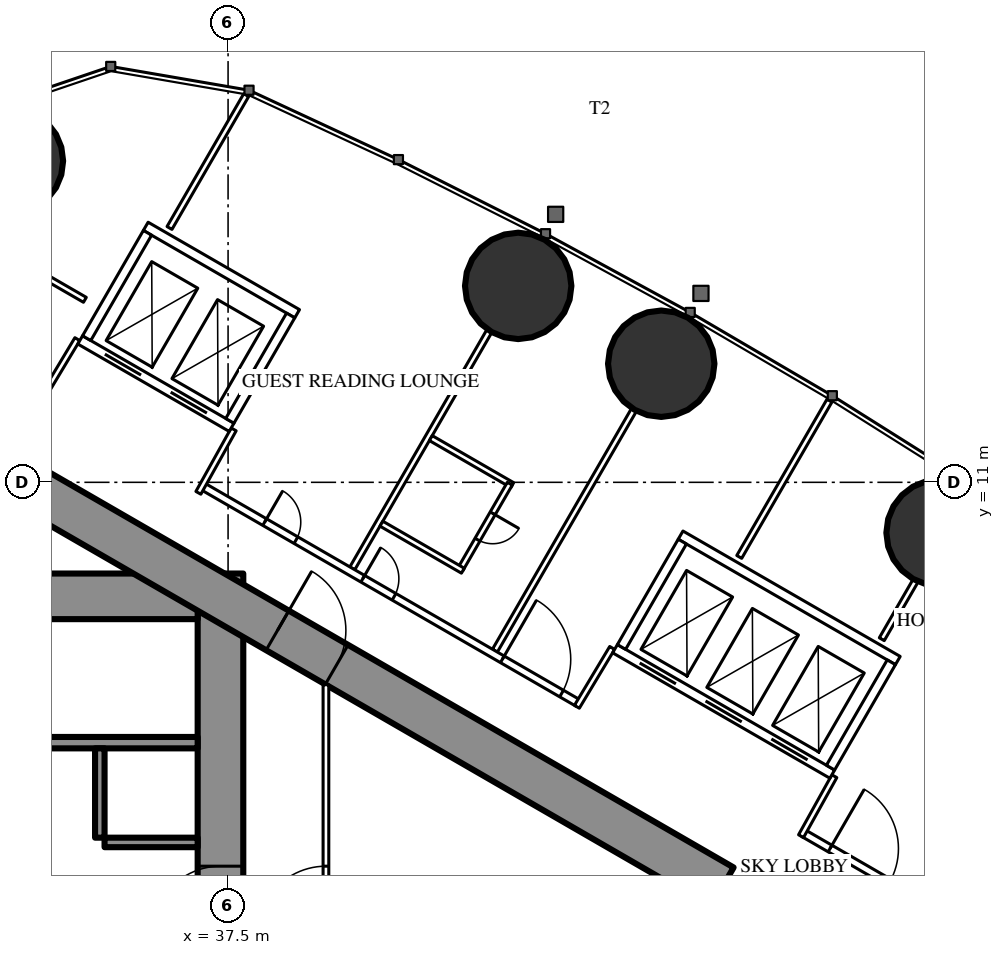
"""IFC4 building model, lengths in metres.
Left out: names, types, materials, properties, quantities, classifications, styles, units other than length and angle.
Written with IfcOpenShell. Run it as: python <this file> out.ifc"""

import sys

from ifc_helpers import new_model, si_unit, direction, frame, frame_2d, origin, origin_2d, place, context, subcontext, project, spatial, rectangle, circle, extrude, element, fill, save


model = new_model("IFC4")
c1 = context("Model", 3, precision=1e-05, world=origin(), true_north=direction((0.0, 1.0)))
c2 = subcontext(c1, "Body", "Model", "MODEL_VIEW")
j1 = project(units=[si_unit("LENGTHUNIT", "METRE"), si_unit("PLANEANGLEUNIT", "RADIAN")], contexts=[c1])
p1 = place(None, origin())
s1 = spatial("IfcSite", under=j1, at=p1, CompositionType="ELEMENT")
p2 = place(p1, origin())
s2 = spatial("IfcBuilding", under=s1, at=p2, CompositionType="ELEMENT")
p3 = place(p2, frame((0.0, 0.0, 156.3)))
s3 = spatial("IfcBuildingStorey", under=s2, at=p3, CompositionType="ELEMENT", Elevation=156.3)
for number, where, z_axis, x_axis in (
    (1, (31.76, 19.456, 0.0), (0.0, 0.0, 1.0), (1.0, 0.0, 0.0)),
    (2, (56.221, 9.672, 0.0), (0.0, 0.0, 1.0), (1.0, 0.0, 0.0)),
    (3, (48.897, 14.121, 0.0), (0.0, 0.0, 1.0), (1.0, 0.0, 0.0)),
    (4, (45.134, 16.168, 0.0), (0.0, 0.0, 1.0), (1.0, 0.0, 0.0)),
):
    element("IfcColumn", number, at=place(p3, frame(where, z_axis=z_axis, x_axis=x_axis)), inside=s3, PredefinedType="COLUMN", context=c2, shape_type="SweptSolid", body=[
        extrude(circle(Radius=1.4, at=origin_2d()), origin(), (0.0, 0.0, 1.0), 3.5),
    ])
p4 = place(p3, frame((37.3, -8.6, 0.0), z_axis=(0.0, 0.0, 1.0), x_axis=(0.0, 1.0, 0.0)))
e5 = element("IfcWall", 5, at=p4, inside=s3, PredefinedType="SHEAR", context=c2, shape_type="SweptSolid", body=[
    extrude(rectangle(XDim=17.2, YDim=1.2, at=frame_2d((8.6, 0.0))), origin(), (0.0, 0.0, 1.0), 3.5),
])
p5 = place(p4, frame((7.7, 0.0, 0.0)))
e6 = element("IfcOpeningElement", 6, at=p5, cuts=e5, PredefinedType="OPENING", context=c2, shape_type="SweptSolid", body=[
    extrude(rectangle(XDim=1.8, YDim=2.2, at=frame_2d((0.9, 1.1))), frame((0.0, 0.61, 0.0), z_axis=(0.0, -1.0, 0.0), x_axis=(1.0, 0.0, 0.0)), (0.0, 0.0, 1.0), 1.22),
])
p6 = place(p3, frame((28.3, 8.0, 0.0), z_axis=(0.0, 0.0, 1.0), x_axis=(1.0, 0.0, 0.0)))
e7 = element("IfcWall", 7, at=p6, inside=s3, PredefinedType="SHEAR", context=c2, shape_type="SweptSolid", body=[
    extrude(rectangle(XDim=8.4, YDim=1.2, at=frame_2d((4.2, 0.0))), origin(), (0.0, 0.0, 1.0), 3.5),
])
p7 = place(p6, frame((0.25, 0.0, 0.0)))
e8 = element("IfcOpeningElement", 8, at=p7, cuts=e7, PredefinedType="OPENING", context=c2, shape_type="SweptSolid", body=[
    extrude(rectangle(XDim=1.0, YDim=2.2, at=frame_2d((0.5, 1.1))), frame((0.0, 0.61, 0.0), z_axis=(0.0, -1.0, 0.0), x_axis=(1.0, 0.0, 0.0)), (0.0, 0.0, 1.0), 1.22),
])
p8 = place(p3, frame((28.3, 4.15, 0.0), z_axis=(0.0, 0.0, 1.0), x_axis=(1.0, 0.0, 0.0)))
e9 = element("IfcWall", 9, at=p8, inside=s3, PredefinedType="SHEAR", context=c2, shape_type="SweptSolid", body=[
    extrude(rectangle(XDim=8.4, YDim=0.3, at=frame_2d((4.2, 0.0))), origin(), (0.0, 0.0, 1.0), 3.5),
])
p9 = place(p3, frame((34.125, 1.65, 0.0), z_axis=(0.0, 0.0, 1.0), x_axis=(0.0, 1.0, 0.0)))
e10 = element("IfcWall", 10, at=p9, inside=s3, PredefinedType="SHEAR", context=c2, shape_type="SweptSolid", body=[
    extrude(rectangle(XDim=2.35, YDim=0.25, at=frame_2d((1.175, 0.0))), origin(), (0.0, 0.0, 1.0), 3.5),
])
p10 = place(p3, frame((34.25, 1.525, 0.0), z_axis=(0.0, 0.0, 1.0), x_axis=(1.0, 0.0, 0.0)))
e11 = element("IfcWall", 11, at=p10, inside=s3, PredefinedType="SHEAR", context=c2, shape_type="SweptSolid", body=[
    extrude(rectangle(XDim=2.45, YDim=0.25, at=frame_2d((1.225, 0.0))), origin(), (0.0, 0.0, 1.0), 3.5),
])
p11 = place(p3, frame((27.2, -13.8, 0.0), z_axis=(0.0, 0.0, 1.0), x_axis=(0.866027159892, 0.499996958321, 0.0)))
e12 = element("IfcWall", 12, at=p11, inside=s3, PredefinedType="SHEAR", context=c2, shape_type="SweptSolid", body=[
    extrude(rectangle(XDim=27.947, YDim=1.2, at=frame_2d((13.973, 0.0))), origin(), (0.0, 0.0, 1.0), 3.5),
])
p12 = place(p11, frame((4.6, 0.0, 0.0)))
e13 = element("IfcOpeningElement", 13, at=p12, cuts=e12, PredefinedType="OPENING", context=c2, shape_type="SweptSolid", body=[
    extrude(rectangle(XDim=1.0, YDim=2.2, at=frame_2d((0.5, 1.1))), frame((0.0, 0.61, 0.0), z_axis=(0.0, -1.0, 0.0), x_axis=(1.0, 0.0, 0.0)), (0.0, 0.0, 1.0), 1.22),
])
p13 = place(p11, frame((13.395, 0.0, 0.0)))
e14 = element("IfcOpeningElement", 14, at=p13, cuts=e12, PredefinedType="OPENING", context=c2, shape_type="SweptSolid", body=[
    extrude(rectangle(XDim=1.8, YDim=2.2, at=frame_2d((0.9, 1.1))), frame((0.0, 0.61, 0.0), z_axis=(0.0, -1.0, 0.0), x_axis=(1.0, 0.0, 0.0)), (0.0, 0.0, 1.0), 1.22),
])
p14 = place(p3, frame((27.2, 13.8, 0.0), z_axis=(0.0, 0.0, 1.0), x_axis=(0.866024515034, -0.500001539357, 0.0)))
e15 = element("IfcWall", 15, at=p14, inside=s3, PredefinedType="SHEAR", context=c2, shape_type="SweptSolid", body=[
    extrude(rectangle(XDim=26.907, YDim=1.2, at=frame_2d((13.454, 0.0))), origin(), (0.0, 0.0, 1.0), 3.5),
])
p15 = place(p14, frame((4.6, 0.0, 0.0)))
e16 = element("IfcOpeningElement", 16, at=p15, cuts=e15, PredefinedType="OPENING", context=c2, shape_type="SweptSolid", body=[
    extrude(rectangle(XDim=1.0, YDim=2.2, at=frame_2d((0.5, 1.1))), frame((0.0, 0.61, 0.0), z_axis=(0.0, -1.0, 0.0), x_axis=(1.0, 0.0, 0.0)), (0.0, 0.0, 1.0), 1.22),
])
p16 = place(p14, frame((13.395, 0.0, 0.0)))
e17 = element("IfcOpeningElement", 17, at=p16, cuts=e15, PredefinedType="OPENING", context=c2, shape_type="SweptSolid", body=[
    extrude(rectangle(XDim=1.8, YDim=2.2, at=frame_2d((0.9, 1.1))), frame((0.0, 0.61, 0.0), z_axis=(0.0, -1.0, 0.0), x_axis=(1.0, 0.0, 0.0)), (0.0, 0.0, 1.0), 1.22),
])
p17 = place(p3, frame((40.769, 8.737, 0.0), z_axis=(0.0, 0.0, 1.0), x_axis=(0.500013115284, 0.866017831539, 0.0)))
e18 = element("IfcWall", 18, at=p17, inside=s3, PredefinedType="PARTITIONING", context=c2, shape_type="SweptSolid", body=[
    extrude(rectangle(XDim=7.198, YDim=0.15, at=frame_2d((3.599, 0.0))), origin(), (0.0, 0.0, 1.0), 2.3),
])
p18 = place(p3, frame((44.521, 6.571, 0.0), z_axis=(0.0, 0.0, 1.0), x_axis=(0.500020376429, 0.866013639128, 0.0)))
e19 = element("IfcWall", 19, at=p18, inside=s3, PredefinedType="PARTITIONING", context=c2, shape_type="SweptSolid", body=[
    extrude(rectangle(XDim=7.306, YDim=0.15, at=frame_2d((3.653, 0.0))), origin(), (0.0, 0.0, 1.0), 2.3),
])
p19 = place(p3, frame((35.959, 17.692, 0.0), z_axis=(0.0, 0.0, 1.0), x_axis=(0.499991298838, 0.866030427344, 0.0)))
e20 = element("IfcWall", 20, at=p19, inside=s3, PredefinedType="PARTITIONING", context=c2, shape_type="SweptSolid", body=[
    extrude(rectangle(XDim=4.035, YDim=0.15, at=frame_2d((2.018, 0.0))), origin(), (0.0, 0.0, 1.0), 3.25),
])
p20 = place(p3, frame((50.95, 9.037, 0.0), z_axis=(0.0, 0.0, 1.0), x_axis=(0.499988022762, 0.866032318735, 0.0)))
e21 = element("IfcWall", 21, at=p20, inside=s3, PredefinedType="PARTITIONING", context=c2, shape_type="SweptSolid", body=[
    extrude(rectangle(XDim=4.748, YDim=0.15, at=frame_2d((2.374, 0.0))), origin(), (0.0, 0.0, 1.0), 3.25),
])
p21 = place(p3, frame((54.7, 6.872, 0.0), z_axis=(0.0, 0.0, 1.0), x_axis=(0.499989690894, 0.866031355668, 0.0)))
e22 = element("IfcWall", 22, at=p21, inside=s3, PredefinedType="PARTITIONING", context=c2, shape_type="SweptSolid", body=[
    extrude(rectangle(XDim=1.766, YDim=0.15, at=frame_2d((0.883, 0.0))), origin(), (0.0, 0.0, 1.0), 3.25),
])
p22 = place(p3, frame((36.834, 10.894, 0.0), z_axis=(0.0, 0.0, 1.0), x_axis=(0.866031655879, -0.499989170898, 0.0)))
e23 = element("IfcWall", 23, at=p22, inside=s3, PredefinedType="PARTITIONING", context=c2, shape_type="SweptSolid", body=[
    extrude(rectangle(XDim=11.41, YDim=0.2, at=frame_2d((5.705, 0.0))), origin(), (0.0, 0.0, 1.0), 3.25),
])
p23 = place(p22, frame((4.861, 0.0, 0.0)))
e24 = element("IfcOpeningElement", 24, at=p23, cuts=e23, PredefinedType="OPENING", context=c2, shape_type="SweptSolid", body=[
    extrude(rectangle(XDim=0.95, YDim=2.2, at=frame_2d((0.475, 1.1))), frame((0.0, 0.11, 0.0), z_axis=(0.0, -1.0, 0.0), x_axis=(1.0, 0.0, 0.0)), (0.0, 0.0, 1.0), 0.22),
])
p24 = place(p22, frame((1.881, 0.0, 0.0)))
e25 = element("IfcOpeningElement", 25, at=p24, cuts=e23, PredefinedType="OPENING", context=c2, shape_type="SweptSolid", body=[
    extrude(rectangle(XDim=0.95, YDim=2.2, at=frame_2d((0.475, 1.1))), frame((0.0, 0.11, 0.0), z_axis=(0.0, -1.0, 0.0), x_axis=(1.0, 0.0, 0.0)), (0.0, 0.0, 1.0), 0.22),
])
p25 = place(p22, frame((9.102, 0.0, 0.0)))
e26 = element("IfcOpeningElement", 26, at=p25, cuts=e23, PredefinedType="OPENING", context=c2, shape_type="SweptSolid", body=[
    extrude(rectangle(XDim=1.8, YDim=2.2, at=frame_2d((0.9, 1.1))), frame((0.0, 0.11, 0.0), z_axis=(0.0, -1.0, 0.0), x_axis=(1.0, 0.0, 0.0)), (0.0, 0.0, 1.0), 0.22),
])
p26 = place(p3, frame((52.639, 1.769, 0.0), z_axis=(0.0, 0.0, 1.0), x_axis=(0.866027340901, -0.4999966448, 0.0)))
e27 = element("IfcWall", 27, at=p26, inside=s3, PredefinedType="PARTITIONING", context=c2, shape_type="SweptSolid", body=[
    extrude(rectangle(XDim=3.417, YDim=0.2, at=frame_2d((1.708, 0.0))), origin(), (0.0, 0.0, 1.0), 3.25),
])
p27 = place(p26, frame((0.809, 0.0, 0.0)))
e28 = element("IfcOpeningElement", 28, at=p27, cuts=e27, PredefinedType="OPENING", context=c2, shape_type="SweptSolid", body=[
    extrude(rectangle(XDim=1.8, YDim=2.2, at=frame_2d((0.9, 1.1))), frame((0.0, 0.11, 0.0), z_axis=(0.0, -1.0, 0.0), x_axis=(1.0, 0.0, 0.0)), (0.0, 0.0, 1.0), 0.22),
])
p28 = place(p3, frame((36.719, 10.723, 0.0), z_axis=(0.0, 0.0, 1.0), x_axis=(0.486348184724, 0.87376509613, 0.0)))
e29 = element("IfcWall", 29, at=p28, inside=s3, PredefinedType="PARTITIONING", context=c2, shape_type="SweptSolid", body=[
    extrude(rectangle(XDim=1.91, YDim=0.15, at=frame_2d((0.955, 0.0))), origin(), (0.0, 0.0, 1.0), 3.25),
])
for number, where, z_axis, x_axis in (
    (30, (33.533, 14.767, 0.0), (0.0, 0.0, 1.0), (-0.514, -0.858, 0.0)),
    (31, (52.576, 1.689, 0.0), (0.0, 0.0, 1.0), (0.485, 0.874, 0.0)),
    (32, (47.606, 6.643, 0.0), (0.0, 0.0, 1.0), (-0.514, -0.858, 0.0)),
):
    element("IfcWall", number, at=place(p3, frame(where, z_axis=z_axis, x_axis=x_axis)), inside=s3, PredefinedType="PARTITIONING", context=c2, shape_type="SweptSolid", body=[
        extrude(rectangle(XDim=1.805, YDim=0.15, at=frame_2d((0.902, 0.0))), origin(), (0.0, 0.0, 1.0), 3.25),
    ])
p29 = place(p3, frame((42.834, 12.164, 0.0), z_axis=(0.0, 0.0, 1.0), x_axis=(0.866031185235, -0.4999899861, 0.0)))
e33 = element("IfcWall", 33, at=p29, inside=s3, PredefinedType="PARTITIONING", context=c2, shape_type="SweptSolid", body=[
    extrude(rectangle(XDim=2.475, YDim=0.15, at=frame_2d((1.238, 0.0))), origin(), (0.0, 0.0, 1.0), 3.25),
])
p30 = place(p3, frame((43.613, 8.712, 0.0), z_axis=(0.0, 0.0, 1.0), x_axis=(0.500006934395, 0.866021400173, 0.0)))
e34 = element("IfcWall", 34, at=p30, inside=s3, PredefinedType="PARTITIONING", context=c2, shape_type="SweptSolid", body=[
    extrude(rectangle(XDim=2.6, YDim=0.15, at=frame_2d((1.3, 0.0))), origin(), (0.0, 0.0, 1.0), 3.25),
])
p31 = place(p30, frame((0.9, 0.0, 0.0)))
e35 = element("IfcOpeningElement", 35, at=p31, cuts=e34, PredefinedType="OPENING", context=c2, shape_type="SweptSolid", body=[
    extrude(rectangle(XDim=0.8, YDim=2.2, at=frame_2d((0.4, 1.1))), frame((0.0, 0.085, 0.0), z_axis=(0.0, -1.0, 0.0), x_axis=(1.0, 0.0, 0.0)), (0.0, 0.0, 1.0), 0.17),
])
p32 = place(p3, frame((41.534, 9.912, 0.0), z_axis=(0.0, 0.0, 1.0), x_axis=(0.866031185235, -0.4999899861, 0.0)))
e36 = element("IfcWall", 36, at=p32, inside=s3, PredefinedType="PARTITIONING", context=c2, shape_type="SweptSolid", body=[
    extrude(rectangle(XDim=2.475, YDim=0.15, at=frame_2d((1.238, 0.0))), origin(), (0.0, 0.0, 1.0), 2.45),
])
p33 = place(p3, frame((31.589, 17.04, 0.0), z_axis=(0.0, 0.0, 1.0), x_axis=(0.866006523861, -0.500032699561, 0.0)))
e37 = element("IfcWall", 37, at=p33, inside=s3, PredefinedType="PARTITIONING", context=c2, shape_type="SweptSolid", body=[
    extrude(rectangle(XDim=2.475, YDim=0.15, at=frame_2d((1.237, 0.0))), origin(), (0.0, 0.0, 1.0), 3.25),
])
p34 = place(p3, frame((40.075, -5.674, 0.0), z_axis=(0.0, 0.0, 1.0), x_axis=(0.0, 1.0, 0.0)))
e38 = element("IfcWall", 38, at=p34, inside=s3, PredefinedType="PARTITIONING", context=c2, shape_type="SweptSolid", body=[
    extrude(rectangle(XDim=11.348, YDim=0.15, at=frame_2d((5.674, 0.0))), origin(), (0.0, 0.0, 1.0), 3.25),
])
p35 = place(p34, frame((4.774, 0.0, 0.0)))
e39 = element("IfcOpeningElement", 39, at=p35, cuts=e38, PredefinedType="OPENING", context=c2, shape_type="SweptSolid", body=[
    extrude(rectangle(XDim=1.8, YDim=2.2, at=frame_2d((0.9, 1.1))), frame((0.0, 0.085, 0.0), z_axis=(0.0, -1.0, 0.0), x_axis=(1.0, 0.0, 0.0)), (0.0, 0.0, 1.0), 0.17),
])
p36 = place(p3, frame((33.608, 14.747, 0.0), z_axis=(0.0, 0.0, 1.0), x_axis=(0.866043305498, -0.49996899204, 0.0)))
e40 = element("IfcWall", 40, at=p36, inside=s3, PredefinedType="PARTITIONING", context=c2, shape_type="SweptSolid", body=[
    extrude(rectangle(XDim=4.6, YDim=0.25, at=frame_2d((2.3, 0.0))), origin(), (0.0, 0.0, 1.0), 3.25),
])
p37 = place(p36, frame((0.75, 0.0, 0.0)))
e41 = element("IfcOpeningElement", 41, at=p37, cuts=e40, PredefinedType="OPENING", context=c2, shape_type="SweptSolid", body=[
    extrude(rectangle(XDim=1.1, YDim=2.2, at=frame_2d((0.55, 1.1))), frame((0.0, 0.135, 0.0), z_axis=(0.0, -1.0, 0.0), x_axis=(1.0, 0.0, 0.0)), (0.0, 0.0, 1.0), 0.27),
])
p38 = place(p36, frame((2.75, 0.0, 0.0)))
e42 = element("IfcOpeningElement", 42, at=p38, cuts=e40, PredefinedType="OPENING", context=c2, shape_type="SweptSolid", body=[
    extrude(rectangle(XDim=1.1, YDim=2.2, at=frame_2d((0.55, 1.1))), frame((0.0, 0.135, 0.0), z_axis=(0.0, -1.0, 0.0), x_axis=(1.0, 0.0, 0.0)), (0.0, 0.0, 1.0), 0.27),
])
p39 = place(p3, frame((35.333, 17.736, 0.0), z_axis=(0.0, 0.0, 1.0), x_axis=(0.866043305498, -0.49996899204, 0.0)))
e43 = element("IfcWall", 43, at=p39, inside=s3, PredefinedType="PARTITIONING", context=c2, shape_type="SweptSolid", body=[
    extrude(rectangle(XDim=4.6, YDim=0.25, at=frame_2d((2.3, 0.0))), origin(), (0.0, 0.0, 1.0), 3.25),
])
for number, where, z_axis, x_axis in (
    (44, (33.779, 14.793, 0.0), (0.0, 0.0, 1.0), (0.5, 0.866, 0.0)),
    (45, (37.547, 12.618, 0.0), (0.0, 0.0, 1.0), (0.5, 0.866, 0.0)),
):
    element("IfcWall", number, at=place(p3, frame(where, z_axis=z_axis, x_axis=x_axis)), inside=s3, PredefinedType="PARTITIONING", context=c2, shape_type="SweptSolid", body=[
        extrude(rectangle(XDim=3.201, YDim=0.25, at=frame_2d((1.6, 0.0))), origin(), (0.0, 0.0, 1.0), 3.25),
    ])
p40 = place(p3, frame((47.681, 6.622, 0.0), z_axis=(0.0, 0.0, 1.0), x_axis=(0.86603344179, -0.499986077507, 0.0)))
e46 = element("IfcWall", 46, at=p40, inside=s3, PredefinedType="PARTITIONING", context=c2, shape_type="SweptSolid", body=[
    extrude(rectangle(XDim=6.6, YDim=0.25, at=frame_2d((3.3, 0.0))), origin(), (0.0, 0.0, 1.0), 3.25),
])
p41 = place(p40, frame((0.75, 0.0, 0.0)))
e47 = element("IfcOpeningElement", 47, at=p41, cuts=e46, PredefinedType="OPENING", context=c2, shape_type="SweptSolid", body=[
    extrude(rectangle(XDim=1.1, YDim=2.2, at=frame_2d((0.55, 1.1))), frame((0.0, 0.135, 0.0), z_axis=(0.0, -1.0, 0.0), x_axis=(1.0, 0.0, 0.0)), (0.0, 0.0, 1.0), 0.27),
])
p42 = place(p40, frame((2.75, 0.0, 0.0)))
e48 = element("IfcOpeningElement", 48, at=p42, cuts=e46, PredefinedType="OPENING", context=c2, shape_type="SweptSolid", body=[
    extrude(rectangle(XDim=1.1, YDim=2.2, at=frame_2d((0.55, 1.1))), frame((0.0, 0.135, 0.0), z_axis=(0.0, -1.0, 0.0), x_axis=(1.0, 0.0, 0.0)), (0.0, 0.0, 1.0), 0.27),
])
p43 = place(p40, frame((4.75, 0.0, 0.0)))
e49 = element("IfcOpeningElement", 49, at=p43, cuts=e46, PredefinedType="OPENING", context=c2, shape_type="SweptSolid", body=[
    extrude(rectangle(XDim=1.1, YDim=2.2, at=frame_2d((0.55, 1.1))), frame((0.0, 0.135, 0.0), z_axis=(0.0, -1.0, 0.0), x_axis=(1.0, 0.0, 0.0)), (0.0, 0.0, 1.0), 0.27),
])
p44 = place(p3, frame((49.406, 9.611, 0.0), z_axis=(0.0, 0.0, 1.0), x_axis=(0.86603344179, -0.499986077507, 0.0)))
e50 = element("IfcWall", 50, at=p44, inside=s3, PredefinedType="PARTITIONING", context=c2, shape_type="SweptSolid", body=[
    extrude(rectangle(XDim=6.6, YDim=0.25, at=frame_2d((3.3, 0.0))), origin(), (0.0, 0.0, 1.0), 3.25),
])
p45 = place(p3, frame((47.852, 6.668, 0.0), z_axis=(0.0, 0.0, 1.0), x_axis=(0.499929347863, 0.866066190972, 0.0)))
e51 = element("IfcWall", 51, at=p45, inside=s3, PredefinedType="PARTITIONING", context=c2, shape_type="SweptSolid", body=[
    extrude(rectangle(XDim=3.201, YDim=0.25, at=frame_2d((1.6, 0.0))), origin(), (0.0, 0.0, 1.0), 3.25),
])
p46 = place(p3, frame((53.352, 3.493, 0.0), z_axis=(0.0, 0.0, 1.0), x_axis=(0.499872130319, 0.866099216793, 0.0)))
e52 = element("IfcWall", 52, at=p46, inside=s3, PredefinedType="PARTITIONING", context=c2, shape_type="SweptSolid", body=[
    extrude(rectangle(XDim=3.2, YDim=0.25, at=frame_2d((1.6, 0.0))), origin(), (0.0, 0.0, 1.0), 3.25),
])
p47 = place(p31, origin())
e53 = element("IfcDoor", 53, at=p47, inside=s3, OperationType="SINGLE_SWING_RIGHT", PredefinedType="DOOR", context=c2, shape_type="SweptSolid", body=[
    extrude(rectangle(XDim=0.8, YDim=2.2, at=frame_2d((0.4, 1.1))), frame((0.0, 0.025, 0.0), z_axis=(0.0, -1.0, 0.0), x_axis=(1.0, 0.0, 0.0)), (0.0, 0.0, 1.0), 0.05),
])
fill(e35, e53)
p48 = place(p23, origin())
e54 = element("IfcDoor", 54, at=p48, inside=s3, OperationType="SINGLE_SWING_LEFT", PredefinedType="DOOR", context=c2, shape_type="SweptSolid", body=[
    extrude(rectangle(XDim=0.95, YDim=2.2, at=frame_2d((0.475, 1.1))), frame((0.0, 0.025, 0.0), z_axis=(0.0, -1.0, 0.0), x_axis=(1.0, 0.0, 0.0)), (0.0, 0.0, 1.0), 0.05),
])
fill(e24, e54)
p49 = place(p24, origin())
e55 = element("IfcDoor", 55, at=p49, inside=s3, OperationType="SINGLE_SWING_LEFT", PredefinedType="DOOR", context=c2, shape_type="SweptSolid", body=[
    extrude(rectangle(XDim=0.95, YDim=2.2, at=frame_2d((0.475, 1.1))), frame((0.0, 0.025, 0.0), z_axis=(0.0, -1.0, 0.0), x_axis=(1.0, 0.0, 0.0)), (0.0, 0.0, 1.0), 0.05),
])
fill(e25, e55)
p50 = place(p27, origin())
e56 = element("IfcDoor", 56, at=p50, inside=s3, OperationType="DOUBLE_DOOR_SINGLE_SWING", PredefinedType="DOOR", context=c2, shape_type="SweptSolid", body=[
    extrude(rectangle(XDim=1.8, YDim=2.2, at=frame_2d((0.9, 1.1))), frame((0.0, 0.025, 0.0), z_axis=(0.0, -1.0, 0.0), x_axis=(1.0, 0.0, 0.0)), (0.0, 0.0, 1.0), 0.05),
])
fill(e28, e56)
p51 = place(p25, origin())
e57 = element("IfcDoor", 57, at=p51, inside=s3, OperationType="DOUBLE_DOOR_SINGLE_SWING", PredefinedType="DOOR", context=c2, shape_type="SweptSolid", body=[
    extrude(rectangle(XDim=1.8, YDim=2.2, at=frame_2d((0.9, 1.1))), frame((0.0, 0.025, 0.0), z_axis=(0.0, -1.0, 0.0), x_axis=(1.0, 0.0, 0.0)), (0.0, 0.0, 1.0), 0.05),
])
fill(e26, e57)
p52 = place(p35, origin())
e58 = element("IfcDoor", 58, at=p52, inside=s3, OperationType="DOUBLE_DOOR_SINGLE_SWING", PredefinedType="DOOR", context=c2, shape_type="SweptSolid", body=[
    extrude(rectangle(XDim=1.8, YDim=2.2, at=frame_2d((0.9, 1.1))), frame((0.0, 0.025, 0.0), z_axis=(0.0, -1.0, 0.0), x_axis=(1.0, 0.0, 0.0)), (0.0, 0.0, 1.0), 0.05),
])
fill(e39, e58)
p53 = place(p16, origin())
e59 = element("IfcDoor", 59, at=p53, inside=s3, OperationType="DOUBLE_DOOR_SINGLE_SWING", PredefinedType="DOOR", context=c2, shape_type="SweptSolid", body=[
    extrude(rectangle(XDim=1.8, YDim=2.2, at=frame_2d((0.9, 1.1))), frame((0.0, 0.025, 0.0), z_axis=(0.0, -1.0, 0.0), x_axis=(1.0, 0.0, 0.0)), (0.0, 0.0, 1.0), 0.05),
])
fill(e17, e59)
p54 = place(p5, origin())
e60 = element("IfcDoor", 60, at=p54, inside=s3, OperationType="DOUBLE_DOOR_SINGLE_SWING", PredefinedType="DOOR", context=c2, shape_type="SweptSolid", body=[
    extrude(rectangle(XDim=1.8, YDim=2.2, at=frame_2d((0.9, 1.1))), frame((0.0, 0.025, 0.0), z_axis=(0.0, -1.0, 0.0), x_axis=(1.0, 0.0, 0.0)), (0.0, 0.0, 1.0), 0.05),
])
fill(e6, e60)
p55 = place(p37, origin())
e61 = element("IfcDoor", 61, at=p55, inside=s3, OperationType="DOUBLE_DOOR_SLIDING", PredefinedType="USERDEFINED", context=c2, shape_type="SweptSolid", body=[
    extrude(rectangle(XDim=1.1, YDim=2.2, at=frame_2d((0.55, 1.1))), frame((0.0, 0.025, 0.0), z_axis=(0.0, -1.0, 0.0), x_axis=(1.0, 0.0, 0.0)), (0.0, 0.0, 1.0), 0.05),
])
fill(e41, e61)
p56 = place(p38, origin())
e62 = element("IfcDoor", 62, at=p56, inside=s3, OperationType="DOUBLE_DOOR_SLIDING", PredefinedType="USERDEFINED", context=c2, shape_type="SweptSolid", body=[
    extrude(rectangle(XDim=1.1, YDim=2.2, at=frame_2d((0.55, 1.1))), frame((0.0, 0.025, 0.0), z_axis=(0.0, -1.0, 0.0), x_axis=(1.0, 0.0, 0.0)), (0.0, 0.0, 1.0), 0.05),
])
fill(e42, e62)
p57 = place(p41, origin())
e63 = element("IfcDoor", 63, at=p57, inside=s3, OperationType="DOUBLE_DOOR_SLIDING", PredefinedType="USERDEFINED", context=c2, shape_type="SweptSolid", body=[
    extrude(rectangle(XDim=1.1, YDim=2.2, at=frame_2d((0.55, 1.1))), frame((0.0, 0.025, 0.0), z_axis=(0.0, -1.0, 0.0), x_axis=(1.0, 0.0, 0.0)), (0.0, 0.0, 1.0), 0.05),
])
fill(e47, e63)
p58 = place(p42, origin())
e64 = element("IfcDoor", 64, at=p58, inside=s3, OperationType="DOUBLE_DOOR_SLIDING", PredefinedType="USERDEFINED", context=c2, shape_type="SweptSolid", body=[
    extrude(rectangle(XDim=1.1, YDim=2.2, at=frame_2d((0.55, 1.1))), frame((0.0, 0.025, 0.0), z_axis=(0.0, -1.0, 0.0), x_axis=(1.0, 0.0, 0.0)), (0.0, 0.0, 1.0), 0.05),
])
fill(e48, e64)
p59 = place(p43, origin())
e65 = element("IfcDoor", 65, at=p59, inside=s3, OperationType="DOUBLE_DOOR_SLIDING", PredefinedType="USERDEFINED", context=c2, shape_type="SweptSolid", body=[
    extrude(rectangle(XDim=1.1, YDim=2.2, at=frame_2d((0.55, 1.1))), frame((0.0, 0.025, 0.0), z_axis=(0.0, -1.0, 0.0), x_axis=(1.0, 0.0, 0.0)), (0.0, 0.0, 1.0), 0.05),
])
fill(e49, e65)
save(model, sys.argv[1])
